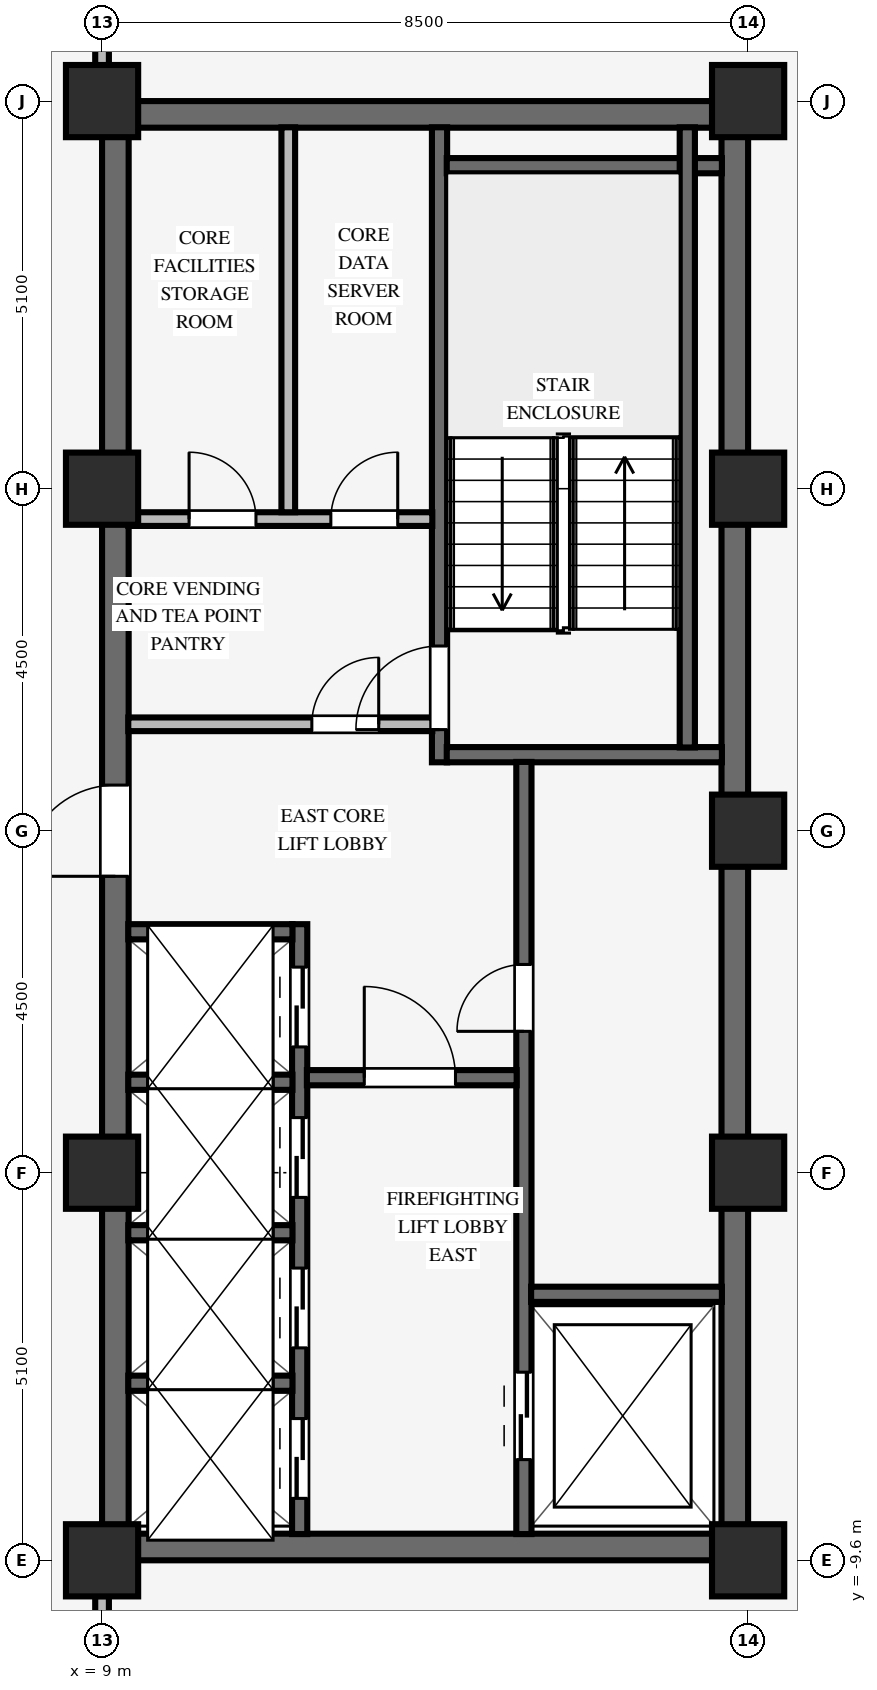
"""IFC4 building model, lengths in metres.
Left out: names, types, materials, properties, quantities, classifications, styles, units other than length and angle.
Written with IfcOpenShell. Run it as: python <this file> out.ifc"""

import sys

from ifc_helpers import new_model, si_unit, direction, frame, frame_2d, origin, origin_2d, place, context, subcontext, project, spatial, rectangle, extrude, source, transform, mapped, element, fill, save


model = new_model("IFC4")
c1 = context("Model", 3, precision=1e-05, world=origin(), true_north=direction((0.0, 1.0)))
c2 = subcontext(c1, "Body", "Model", "MODEL_VIEW")
j1 = project(units=[si_unit("LENGTHUNIT", "METRE"), si_unit("PLANEANGLEUNIT", "RADIAN")], contexts=[c1])
p1 = place(None, origin())
s1 = spatial("IfcSite", under=j1, at=p1, CompositionType="ELEMENT")
p2 = place(p1, origin())
s2 = spatial("IfcBuilding", under=s1, at=p2, CompositionType="ELEMENT")
p3 = place(p2, frame((0.0, 0.0, 223.75)))
s3 = spatial("IfcBuildingStorey", under=s2, at=p3, CompositionType="ELEMENT", Elevation=223.75)
for number, where, z_axis, x_axis in (
    (1, (9.0, -9.425, 0.0), (0.0, 0.0, 1.0), (1.0, 0.0, 0.0)),
    (2, (9.0, 9.425, 0.0), (0.0, 0.0, 1.0), (1.0, 0.0, 0.0)),
):
    element("IfcWall", number, at=place(p3, frame(where, z_axis=z_axis, x_axis=x_axis)), inside=s3, PredefinedType="SHEAR", context=c2, shape_type="SweptSolid", body=[
        extrude(rectangle(XDim=8.5, YDim=0.35, at=frame_2d((4.25, 0.0))), origin(), (0.0, 0.0, 1.0), 3.37),
    ])
p4 = place(p3, frame((9.175, -9.255, 0.0), z_axis=(0.0, 0.0, 1.0), x_axis=(0.0, 1.0, 0.0)))
e3 = element("IfcWall", 3, at=p4, inside=s3, PredefinedType="SHEAR", context=c2, shape_type="SweptSolid", body=[
    extrude(rectangle(XDim=18.51, YDim=0.35, at=frame_2d((9.255, 0.0))), origin(), (0.0, 0.0, 1.0), 3.37),
])
p5 = place(p4, frame((8.655, 0.0, 0.0)))
e4 = element("IfcOpeningElement", 4, at=p5, cuts=e3, PredefinedType="OPENING", context=c2, shape_type="SweptSolid", body=[
    extrude(rectangle(XDim=1.2, YDim=2.15, at=frame_2d((0.6, 1.075))), frame((0.0, 0.185, 0.0), z_axis=(0.0, -1.0, 0.0), x_axis=(1.0, 0.0, 0.0)), (0.0, 0.0, 1.0), 0.37),
])
p6 = place(p3, frame((17.325, -9.255, 0.0), z_axis=(0.0, 0.0, 1.0), x_axis=(0.0, 1.0, 0.0)))
e5 = element("IfcWall", 5, at=p6, inside=s3, PredefinedType="SHEAR", context=c2, shape_type="SweptSolid", body=[
    extrude(rectangle(XDim=18.51, YDim=0.35, at=frame_2d((9.255, 0.0))), origin(), (0.0, 0.0, 1.0), 3.37),
])
for number, where, z_axis, x_axis in (
    (6, (9.0, -9.6, 0.0), (0.0, 0.0, 1.0), (1.0, 0.0, 0.0)),
    (7, (9.0, -4.5, 0.0), (0.0, 0.0, 1.0), (1.0, 0.0, 0.0)),
    (8, (9.0, 4.5, 0.0), (0.0, 0.0, 1.0), (1.0, 0.0, 0.0)),
    (9, (9.0, 9.6, 0.0), (0.0, 0.0, 1.0), (1.0, 0.0, 0.0)),
    (10, (17.5, -9.6, 0.0), (0.0, 0.0, 1.0), (1.0, 0.0, 0.0)),
    (11, (17.5, -4.5, 0.0), (0.0, 0.0, 1.0), (1.0, 0.0, 0.0)),
    (12, (17.5, 4.5, 0.0), (0.0, 0.0, 1.0), (1.0, 0.0, 0.0)),
    (13, (17.5, 9.6, 0.0), (0.0, 0.0, 1.0), (1.0, 0.0, 0.0)),
    (14, (17.5, 0.0, 0.0), (0.0, 0.0, 1.0), (1.0, 0.0, 0.0)),
):
    element("IfcColumn", number, at=place(p3, frame(where, z_axis=z_axis, x_axis=x_axis)), inside=s3, PredefinedType="COLUMN", context=c2, shape_type="SweptSolid", body=[
        extrude(rectangle(XDim=0.95, YDim=0.95, at=origin_2d()), origin(), (0.0, 0.0, 1.0), 3.37),
    ])
p7 = place(p3, frame((13.44, 0.9, 0.0), z_axis=(0.0, 0.0, 1.0), x_axis=(0.0, 1.0, 0.0)))
e15 = element("IfcWall", 15, at=p7, inside=s3, PredefinedType="SHEAR", context=c2, shape_type="SweptSolid", body=[
    extrude(rectangle(XDim=8.355, YDim=0.2, at=frame_2d((4.177, 0.0))), origin(), (0.0, 0.0, 1.0), 3.37),
])
p8 = place(p7, frame((0.43, 0.0, 0.0)))
e16 = element("IfcOpeningElement", 16, at=p8, cuts=e15, PredefinedType="OPENING", context=c2, shape_type="SweptSolid", body=[
    extrude(rectangle(XDim=1.1, YDim=2.15, at=frame_2d((0.55, 1.075))), frame((0.0, 0.11, 0.0), z_axis=(0.0, -1.0, 0.0), x_axis=(1.0, 0.0, 0.0)), (0.0, 0.0, 1.0), 0.22),
])
for number, where, z_axis, x_axis in (
    (17, (13.535, 1.0, 0.0), (0.0, 0.0, 1.0), (1.0, 0.0, 0.0)),
    (18, (13.535, 8.75, 0.0), (0.0, 0.0, 1.0), (1.0, 0.0, 0.0)),
):
    element("IfcWall", number, at=place(p3, frame(where, z_axis=z_axis, x_axis=x_axis)), inside=s3, PredefinedType="SHEAR", context=c2, shape_type="SweptSolid", body=[
        extrude(rectangle(XDim=3.62, YDim=0.2, at=frame_2d((1.81, 0.0))), origin(), (0.0, 0.0, 1.0), 3.37),
    ])
p9 = place(p3, frame((16.7, 1.095, 0.0), z_axis=(0.0, 0.0, 1.0), x_axis=(0.0, 1.0, 0.0)))
e19 = element("IfcWall", 19, at=p9, inside=s3, PredefinedType="SHEAR", context=c2, shape_type="SweptSolid", body=[
    extrude(rectangle(XDim=8.16, YDim=0.2, at=frame_2d((4.08, 0.0))), origin(), (0.0, 0.0, 1.0), 3.37),
])
p10 = place(p3, frame((14.55, -9.255, 0.0), z_axis=(0.0, 0.0, 1.0), x_axis=(0.0, 1.0, 0.0)))
e20 = element("IfcWall", 20, at=p10, inside=s3, PredefinedType="SHEAR", context=c2, shape_type="SweptSolid", body=[
    extrude(rectangle(XDim=10.16, YDim=0.2, at=frame_2d((5.08, 0.0))), origin(), (0.0, 0.0, 1.0), 3.37),
])
p11 = place(p10, frame((6.615, 0.0, 0.0)))
e21 = element("IfcOpeningElement", 21, at=p11, cuts=e20, PredefinedType="OPENING", context=c2, shape_type="SweptSolid", body=[
    extrude(rectangle(XDim=0.88, YDim=2.1, at=frame_2d((0.44, 1.05))), frame((0.0, 0.11, 0.0), z_axis=(0.0, -1.0, 0.0), x_axis=(1.0, 0.0, 0.0)), (0.0, 0.0, 1.0), 0.22),
])
p12 = place(p10, frame((0.98, 0.0, 0.0)))
e22 = element("IfcOpeningElement", 22, at=p12, cuts=e20, PredefinedType="OPENING", context=c2, shape_type="SweptSolid", body=[
    extrude(rectangle(XDim=1.15, YDim=2.15, at=frame_2d((0.575, 1.075))), frame((0.0, 0.11, 0.0), z_axis=(0.0, -1.0, 0.0), x_axis=(1.0, 0.0, 0.0)), (0.0, 0.0, 1.0), 0.22),
])
p13 = place(p3, frame((14.645, -6.1, 0.0), z_axis=(0.0, 0.0, 1.0), x_axis=(1.0, 0.0, 0.0)))
e23 = element("IfcWall", 23, at=p13, inside=s3, PredefinedType="SHEAR", context=c2, shape_type="SweptSolid", body=[
    extrude(rectangle(XDim=2.51, YDim=0.2, at=frame_2d((1.255, 0.0))), origin(), (0.0, 0.0, 1.0), 3.37),
])
p14 = place(p3, frame((11.6, -9.255, 0.0), z_axis=(0.0, 0.0, 1.0), x_axis=(0.0, 1.0, 0.0)))
e24 = element("IfcWall", 24, at=p14, inside=s3, PredefinedType="SHEAR", context=c2, shape_type="SweptSolid", body=[
    extrude(rectangle(XDim=8.025, YDim=0.2, at=frame_2d((4.012, 0.0))), origin(), (0.0, 0.0, 1.0), 3.37),
])
p15 = place(p14, frame((0.47, 0.0, 0.0)))
e25 = element("IfcOpeningElement", 25, at=p15, cuts=e24, PredefinedType="OPENING", context=c2, shape_type="SweptSolid", body=[
    extrude(rectangle(XDim=1.05, YDim=2.15, at=frame_2d((0.525, 1.075))), frame((0.0, 0.11, 0.0), z_axis=(0.0, -1.0, 0.0), x_axis=(1.0, 0.0, 0.0)), (0.0, 0.0, 1.0), 0.22),
])
p16 = place(p14, frame((2.45, 0.0, 0.0)))
e26 = element("IfcOpeningElement", 26, at=p16, cuts=e24, PredefinedType="OPENING", context=c2, shape_type="SweptSolid", body=[
    extrude(rectangle(XDim=1.05, YDim=2.15, at=frame_2d((0.525, 1.075))), frame((0.0, 0.11, 0.0), z_axis=(0.0, -1.0, 0.0), x_axis=(1.0, 0.0, 0.0)), (0.0, 0.0, 1.0), 0.22),
])
p17 = place(p14, frame((4.43, 0.0, 0.0)))
e27 = element("IfcOpeningElement", 27, at=p17, cuts=e24, PredefinedType="OPENING", context=c2, shape_type="SweptSolid", body=[
    extrude(rectangle(XDim=1.05, YDim=2.15, at=frame_2d((0.525, 1.075))), frame((0.0, 0.11, 0.0), z_axis=(0.0, -1.0, 0.0), x_axis=(1.0, 0.0, 0.0)), (0.0, 0.0, 1.0), 0.22),
])
p18 = place(p14, frame((6.41, 0.0, 0.0)))
e28 = element("IfcOpeningElement", 28, at=p18, cuts=e24, PredefinedType="OPENING", context=c2, shape_type="SweptSolid", body=[
    extrude(rectangle(XDim=1.05, YDim=2.15, at=frame_2d((0.525, 1.075))), frame((0.0, 0.11, 0.0), z_axis=(0.0, -1.0, 0.0), x_axis=(1.0, 0.0, 0.0)), (0.0, 0.0, 1.0), 0.22),
])
p19 = place(p3, frame((11.695, -3.25, 0.0), z_axis=(0.0, 0.0, 1.0), x_axis=(1.0, 0.0, 0.0)))
e29 = element("IfcWall", 29, at=p19, inside=s3, PredefinedType="SHEAR", context=c2, shape_type="SweptSolid", body=[
    extrude(rectangle(XDim=2.76, YDim=0.2, at=frame_2d((1.38, 0.0))), origin(), (0.0, 0.0, 1.0), 3.37),
])
p20 = place(p19, frame((0.755, 0.0, 0.0)))
e30 = element("IfcOpeningElement", 30, at=p20, cuts=e29, PredefinedType="OPENING", context=c2, shape_type="SweptSolid", body=[
    extrude(rectangle(XDim=1.2, YDim=2.15, at=frame_2d((0.6, 1.075))), frame((0.0, 0.11, 0.0), z_axis=(0.0, -1.0, 0.0), x_axis=(1.0, 0.0, 0.0)), (0.0, 0.0, 1.0), 0.22),
])
for number, where, z_axis, x_axis in (
    (31, (9.345, -7.27, 0.0), (0.0, 0.0, 1.0), (1.0, 0.0, 0.0)),
    (32, (9.345, -5.29, 0.0), (0.0, 0.0, 1.0), (1.0, 0.0, 0.0)),
    (33, (9.345, -3.31, 0.0), (0.0, 0.0, 1.0), (1.0, 0.0, 0.0)),
    (34, (9.345, -1.33, 0.0), (0.0, 0.0, 1.0), (1.0, 0.0, 0.0)),
):
    element("IfcWall", number, at=place(p3, frame(where, z_axis=z_axis, x_axis=x_axis)), inside=s3, PredefinedType="SHEAR", context=c2, shape_type="SweptSolid", body=[
        extrude(rectangle(XDim=2.16, YDim=0.2, at=frame_2d((1.08, 0.0))), origin(), (0.0, 0.0, 1.0), 3.37),
    ])
p21 = place(p3, frame((9.345, 1.4, 0.0), z_axis=(0.0, 0.0, 1.0), x_axis=(1.0, 0.0, 0.0)))
e35 = element("IfcWall", 35, at=p21, inside=s3, PredefinedType="PARTITIONING", context=c2, shape_type="SweptSolid", body=[
    extrude(rectangle(XDim=4.0, YDim=0.18, at=frame_2d((2.0, 0.0))), origin(), (0.0, 0.0, 1.0), 3.36),
])
p22 = place(p21, frame((2.415, 0.0, 0.0)))
e36 = element("IfcOpeningElement", 36, at=p22, cuts=e35, PredefinedType="OPENING", context=c2, shape_type="SweptSolid", body=[
    extrude(rectangle(XDim=0.88, YDim=2.1, at=frame_2d((0.44, 1.05))), frame((0.0, 0.1, 0.0), z_axis=(0.0, -1.0, 0.0), x_axis=(1.0, 0.0, 0.0)), (0.0, 0.0, 1.0), 0.2),
])
p23 = place(p3, frame((9.345, 4.1, 0.0), z_axis=(0.0, 0.0, 1.0), x_axis=(1.0, 0.0, 0.0)))
e37 = element("IfcWall", 37, at=p23, inside=s3, PredefinedType="PARTITIONING", context=c2, shape_type="SweptSolid", body=[
    extrude(rectangle(XDim=4.0, YDim=0.18, at=frame_2d((2.0, 0.0))), origin(), (0.0, 0.0, 1.0), 3.36),
])
p24 = place(p23, frame((0.8, 0.0, 0.0)))
e38 = element("IfcOpeningElement", 38, at=p24, cuts=e37, PredefinedType="OPENING", context=c2, shape_type="SweptSolid", body=[
    extrude(rectangle(XDim=0.88, YDim=2.1, at=frame_2d((0.44, 1.05))), frame((0.0, 0.1, 0.0), z_axis=(0.0, -1.0, 0.0), x_axis=(1.0, 0.0, 0.0)), (0.0, 0.0, 1.0), 0.2),
])
p25 = place(p23, frame((2.665, 0.0, 0.0)))
e39 = element("IfcOpeningElement", 39, at=p25, cuts=e37, PredefinedType="OPENING", context=c2, shape_type="SweptSolid", body=[
    extrude(rectangle(XDim=0.88, YDim=2.1, at=frame_2d((0.44, 1.05))), frame((0.0, 0.1, 0.0), z_axis=(0.0, -1.0, 0.0), x_axis=(1.0, 0.0, 0.0)), (0.0, 0.0, 1.0), 0.2),
])
p26 = place(p3, frame((11.45, 4.19, 0.0), z_axis=(0.0, 0.0, 1.0), x_axis=(0.0, 1.0, 0.0)))
e40 = element("IfcWall", 40, at=p26, inside=s3, PredefinedType="PARTITIONING", context=c2, shape_type="SweptSolid", body=[
    extrude(rectangle(XDim=5.065, YDim=0.18, at=frame_2d((2.532, 0.0))), origin(), (0.0, 0.0, 1.0), 3.36),
])
for number, where, z_axis, x_axis in (
    (41, (9.0, -15.814, 0.0), (0.0, 0.0, 1.0), (0.0, 1.0, 0.0)),
    (42, (9.0, 10.071, 0.0), (0.0, 0.0, 1.0), (0.0, 1.0, 0.0)),
):
    element("IfcWall", number, at=place(p3, frame(where, z_axis=z_axis, x_axis=x_axis)), inside=s3, PredefinedType="PARTITIONING", context=c2, shape_type="SweptSolid", body=[
        extrude(rectangle(XDim=5.743, YDim=0.18, at=frame_2d((2.872, 0.0))), origin(), (0.0, 0.0, 1.0), 2.892),
    ])
m1 = source(origin(), c2, "Body", "SweptSolid", [
    extrude(rectangle(XDim=1.1, YDim=2.15, at=frame_2d((0.55, 1.075))), frame((0.0, 0.025, 0.0), z_axis=(0.0, -1.0, 0.0), x_axis=(1.0, 0.0, 0.0)), (0.0, 0.0, 1.0), 0.05),
])
p27 = place(p8, origin())
e43 = element("IfcDoor", 43, at=p27, inside=s3, OperationType="SINGLE_SWING_LEFT", PredefinedType="DOOR", context=c2, shape_type="MappedRepresentation", body=[
    mapped(m1, transform((0.0, 0.0, 0.0), scale=1.0)),
])
fill(e16, e43)
m2 = source(origin(), c2, "Body", "SweptSolid", [
    extrude(rectangle(XDim=0.88, YDim=2.1, at=frame_2d((0.44, 1.05))), frame((0.0, 0.025, 0.0), z_axis=(0.0, -1.0, 0.0), x_axis=(1.0, 0.0, 0.0)), (0.0, 0.0, 1.0), 0.05),
])
p28 = place(p11, origin())
e44 = element("IfcDoor", 44, at=p28, inside=s3, OperationType="SINGLE_SWING_LEFT", PredefinedType="DOOR", context=c2, shape_type="MappedRepresentation", body=[
    mapped(m2, transform((0.0, 0.0, 0.0), scale=1.0)),
])
fill(e21, e44)
m3 = source(origin(), c2, "Body", "SweptSolid", [
    extrude(rectangle(XDim=1.2, YDim=2.15, at=frame_2d((0.6, 1.075))), frame((0.0, 0.025, 0.0), z_axis=(0.0, -1.0, 0.0), x_axis=(1.0, 0.0, 0.0)), (0.0, 0.0, 1.0), 0.05),
])
p29 = place(p20, origin())
e45 = element("IfcDoor", 45, at=p29, inside=s3, OperationType="SINGLE_SWING_LEFT", PredefinedType="DOOR", context=c2, shape_type="MappedRepresentation", body=[
    mapped(m3, transform((0.0, 0.0, 0.0), scale=1.0)),
])
fill(e30, e45)
p30 = place(p5, origin())
e46 = element("IfcDoor", 46, at=p30, inside=s3, OperationType="SINGLE_SWING_LEFT", PredefinedType="DOOR", context=c2, shape_type="MappedRepresentation", body=[
    mapped(m3, transform((0.0, 0.0, 0.0), scale=1.0)),
])
fill(e4, e46)
p31 = place(p22, origin())
e47 = element("IfcDoor", 47, at=p31, inside=s3, OperationType="SINGLE_SWING_RIGHT", PredefinedType="DOOR", context=c2, shape_type="MappedRepresentation", body=[
    mapped(m2, transform((0.0, 0.0, 0.0), scale=1.0)),
])
fill(e36, e47)
p32 = place(p24, origin())
e48 = element("IfcDoor", 48, at=p32, inside=s3, OperationType="SINGLE_SWING_LEFT", PredefinedType="DOOR", context=c2, shape_type="MappedRepresentation", body=[
    mapped(m2, transform((0.0, 0.0, 0.0), scale=1.0)),
])
fill(e38, e48)
p33 = place(p25, origin())
e49 = element("IfcDoor", 49, at=p33, inside=s3, OperationType="SINGLE_SWING_RIGHT", PredefinedType="DOOR", context=c2, shape_type="MappedRepresentation", body=[
    mapped(m2, transform((0.0, 0.0, 0.0), scale=1.0)),
])
fill(e39, e49)
m4 = source(origin(), c2, "Body", "SweptSolid", [
    extrude(rectangle(XDim=1.15, YDim=2.15, at=frame_2d((0.575, 1.075))), frame((0.0, 0.025, 0.0), z_axis=(0.0, -1.0, 0.0), x_axis=(1.0, 0.0, 0.0)), (0.0, 0.0, 1.0), 0.05),
])
p34 = place(p12, origin())
e50 = element("IfcDoor", 50, at=p34, inside=s3, OperationType="DOUBLE_DOOR_SLIDING", PredefinedType="DOOR", context=c2, shape_type="MappedRepresentation", body=[
    mapped(m4, transform((0.0, 0.0, 0.0), scale=1.0)),
])
fill(e22, e50)
m5 = source(origin(), c2, "Body", "SweptSolid", [
    extrude(rectangle(XDim=1.05, YDim=2.15, at=frame_2d((0.525, 1.075))), frame((0.0, 0.025, 0.0), z_axis=(0.0, -1.0, 0.0), x_axis=(1.0, 0.0, 0.0)), (0.0, 0.0, 1.0), 0.05),
])
p35 = place(p15, origin())
e51 = element("IfcDoor", 51, at=p35, inside=s3, OperationType="DOUBLE_DOOR_SLIDING", PredefinedType="DOOR", context=c2, shape_type="MappedRepresentation", body=[
    mapped(m5, transform((0.0, 0.0, 0.0), scale=1.0)),
])
fill(e25, e51)
p36 = place(p16, origin())
e52 = element("IfcDoor", 52, at=p36, inside=s3, OperationType="DOUBLE_DOOR_SLIDING", PredefinedType="DOOR", context=c2, shape_type="MappedRepresentation", body=[
    mapped(m5, transform((0.0, 0.0, 0.0), scale=1.0)),
])
fill(e26, e52)
p37 = place(p17, origin())
e53 = element("IfcDoor", 53, at=p37, inside=s3, OperationType="DOUBLE_DOOR_SLIDING", PredefinedType="DOOR", context=c2, shape_type="MappedRepresentation", body=[
    mapped(m5, transform((0.0, 0.0, 0.0), scale=1.0)),
])
fill(e27, e53)
p38 = place(p18, origin())
e54 = element("IfcDoor", 54, at=p38, inside=s3, OperationType="DOUBLE_DOOR_SLIDING", PredefinedType="DOOR", context=c2, shape_type="MappedRepresentation", body=[
    mapped(m5, transform((0.0, 0.0, 0.0), scale=1.0)),
])
fill(e28, e54)
save(model, sys.argv[1])
